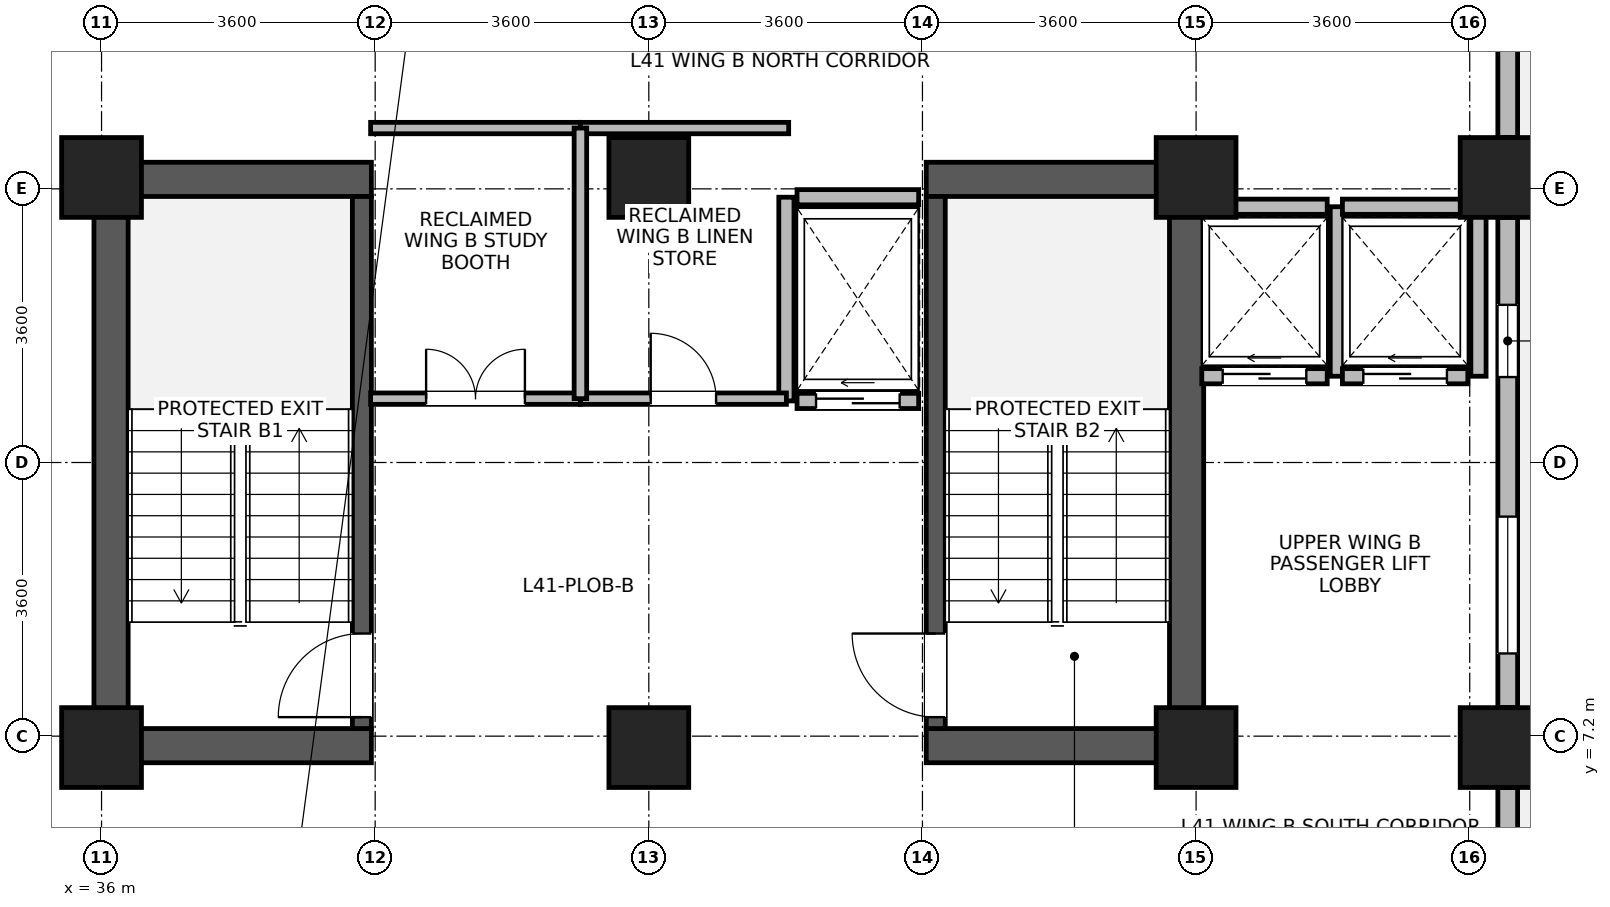
"""IFC4 building model, lengths in metres.
Left out: names, types, materials, properties, quantities, classifications, styles, units other than length and angle.
Written with IfcOpenShell. Run it as: python <this file> out.ifc"""

import sys

from ifc_helpers import new_model, si_unit, direction, frame, frame_2d, origin, origin_2d, place, context, subcontext, project, spatial, rectangle, extrude, source, transform, mapped, element, fill, save


model = new_model("IFC4")
c1 = context("Model", 3, precision=1e-05, world=origin(), true_north=direction((0.0, 1.0)))
c2 = subcontext(c1, "Body", "Model", "MODEL_VIEW")
j1 = project(units=[si_unit("LENGTHUNIT", "METRE"), si_unit("PLANEANGLEUNIT", "RADIAN")], contexts=[c1])
p1 = place(None, origin())
s1 = spatial("IfcSite", under=j1, at=p1, CompositionType="ELEMENT")
p2 = place(p1, origin())
s2 = spatial("IfcBuilding", under=s1, at=p2, CompositionType="ELEMENT")
p3 = place(p2, frame((0.0, 0.0, 162.4)))
s3 = spatial("IfcBuildingStorey", under=s2, at=p3, CompositionType="ELEMENT", Elevation=162.4)
for number, where, z_axis, x_axis in (
    (1, (36.125, 6.85, 0.0), (0.0, 0.0, 1.0), (0.0, 1.0, 0.0)),
    (2, (50.275, 6.85, 0.0), (0.0, 0.0, 1.0), (0.0, 1.0, 0.0)),
):
    element("IfcWall", number, at=place(p3, frame(where, z_axis=z_axis, x_axis=x_axis)), inside=s3, PredefinedType="SHEAR", context=c2, shape_type="SweptSolid", body=[
        extrude(rectangle(XDim=7.9, YDim=0.45, at=frame_2d((3.95, 0.0))), origin(), (0.0, 0.0, 1.0), 3.46),
    ])
for number, where, z_axis, x_axis in (
    (3, (36.35, 7.075, 0.0), (0.0, 0.0, 1.0), (1.0, 0.0, 0.0)),
    (4, (46.85, 7.075, 0.0), (0.0, 0.0, 1.0), (1.0, 0.0, 0.0)),
    (5, (36.35, 14.525, 0.0), (0.0, 0.0, 1.0), (1.0, 0.0, 0.0)),
    (6, (46.85, 14.525, 0.0), (0.0, 0.0, 1.0), (1.0, 0.0, 0.0)),
):
    element("IfcWall", number, at=place(p3, frame(where, z_axis=z_axis, x_axis=x_axis)), inside=s3, PredefinedType="SHEAR", context=c2, shape_type="SweptSolid", body=[
        extrude(rectangle(XDim=3.2, YDim=0.45, at=frame_2d((1.6, 0.0))), origin(), (0.0, 0.0, 1.0), 3.46),
    ])
p4 = place(p3, frame((39.425, 7.3, 0.0), z_axis=(0.0, 0.0, 1.0), x_axis=(0.0, 1.0, 0.0)))
e7 = element("IfcWall", 7, at=p4, inside=s3, PredefinedType="SHEAR", context=c2, shape_type="SweptSolid", body=[
    extrude(rectangle(XDim=7.0, YDim=0.25, at=frame_2d((3.5, 0.0))), origin(), (0.0, 0.0, 1.0), 3.46),
])
p5 = place(p4, frame((0.15, 0.0, 0.0)))
e8 = element("IfcOpeningElement", 8, at=p5, cuts=e7, PredefinedType="OPENING", context=c2, shape_type="SweptSolid", body=[
    extrude(rectangle(XDim=1.1, YDim=2.08, at=frame_2d((0.55, 1.04))), frame((0.0, 0.135, 0.0), z_axis=(0.0, -1.0, 0.0), x_axis=(1.0, 0.0, 0.0)), (0.0, 0.0, 1.0), 0.27),
])
p6 = place(p3, frame((46.975, 7.3, 0.0), z_axis=(0.0, 0.0, 1.0), x_axis=(0.0, 1.0, 0.0)))
e9 = element("IfcWall", 9, at=p6, inside=s3, PredefinedType="SHEAR", context=c2, shape_type="SweptSolid", body=[
    extrude(rectangle(XDim=7.0, YDim=0.25, at=frame_2d((3.5, 0.0))), origin(), (0.0, 0.0, 1.0), 3.46),
])
p7 = place(p6, frame((0.15, 0.0, 0.0)))
e10 = element("IfcOpeningElement", 10, at=p7, cuts=e9, PredefinedType="OPENING", context=c2, shape_type="SweptSolid", body=[
    extrude(rectangle(XDim=1.1, YDim=2.08, at=frame_2d((0.55, 1.04))), frame((0.0, 0.135, 0.0), z_axis=(0.0, -1.0, 0.0), x_axis=(1.0, 0.0, 0.0)), (0.0, 0.0, 1.0), 0.27),
])
m1 = source(origin(), c2, "Body", "SweptSolid", [
    extrude(rectangle(XDim=1.05, YDim=1.05, at=origin_2d()), origin(), (0.0, 0.0, 1.0), 3.7),
])
for number, where, z_axis, x_axis in (
    (11, (36.0, 7.05, 0.0), (0.0, 0.0, 1.0), (1.0, 0.0, 0.0)),
    (12, (36.0, 14.55, 0.0), (0.0, 0.0, 1.0), (1.0, 0.0, 0.0)),
    (13, (43.2, 7.05, 0.0), (0.0, 0.0, 1.0), (1.0, 0.0, 0.0)),
    (14, (43.2, 14.55, 0.0), (0.0, 0.0, 1.0), (1.0, 0.0, 0.0)),
    (15, (50.4, 7.05, 0.0), (0.0, 0.0, 1.0), (1.0, 0.0, 0.0)),
    (16, (50.4, 14.55, 0.0), (0.0, 0.0, 1.0), (1.0, 0.0, 0.0)),
    (17, (54.4, 7.05, 0.0), (0.0, 0.0, 1.0), (1.0, 0.0, 0.0)),
    (18, (54.4, 14.55, 0.0), (0.0, 0.0, 1.0), (1.0, 0.0, 0.0)),
):
    element("IfcColumn", number, at=place(p3, frame(where, z_axis=z_axis, x_axis=x_axis)), inside=s3, PredefinedType="COLUMN", context=c2, shape_type="MappedRepresentation", body=[
        mapped(m1, transform((0.0, 0.0, 0.0), x_axis=(1.0, 0.0, 0.0), y_axis=(0.0, 1.0, 0.0), z_axis=(0.0, 0.0, 1.0), scale=1.0)),
    ])
p8 = place(p3, frame((54.5, 6.524, 0.0), z_axis=(0.0, 0.0, 1.0), x_axis=(0.0, -1.0, 0.0)))
e19 = element("IfcWall", 19, at=p8, inside=s3, PredefinedType="STANDARD", context=c2, shape_type="SweptSolid", body=[
    extrude(rectangle(XDim=4.854, YDim=0.26, at=frame_2d((2.427, 0.0))), origin(), (0.0, 0.0, 1.0), 3.44),
])
p9 = place(p8, frame((2.648, 0.0, 0.0)))
e20 = element("IfcOpeningElement", 20, at=p9, cuts=e19, PredefinedType="OPENING", context=c2, shape_type="SweptSolid", body=[
    extrude(rectangle(XDim=1.5, YDim=2.15, at=frame_2d((0.75, 1.075))), frame((0.0, 0.14, 0.0), z_axis=(0.0, -1.0, 0.0), x_axis=(1.0, 0.0, 0.0)), (0.0, 0.0, 1.0), 0.28),
])
p10 = place(p3, frame((54.5, 14.024, 0.0), z_axis=(0.0, 0.0, 1.0), x_axis=(0.0, -1.0, 0.0)))
e21 = element("IfcWall", 21, at=p10, inside=s3, PredefinedType="STANDARD", context=c2, shape_type="SweptSolid", body=[
    extrude(rectangle(XDim=6.448, YDim=0.26, at=frame_2d((3.224, 0.0))), origin(), (0.0, 0.0, 1.0), 2.99),
])
p11 = place(p10, frame((3.936, 0.0, 0.85)))
e22 = element("IfcOpeningElement", 22, at=p11, cuts=e21, PredefinedType="OPENING", context=c2, shape_type="SweptSolid", body=[
    extrude(rectangle(XDim=1.8, YDim=1.85, at=frame_2d((0.9, 0.925))), frame((0.0, 0.14, 0.0), z_axis=(0.0, -1.0, 0.0), x_axis=(1.0, 0.0, 0.0)), (0.0, 0.0, 1.0), 0.28),
])
p12 = place(p10, frame((1.15, 0.0, 0.85)))
e23 = element("IfcOpeningElement", 23, at=p12, cuts=e21, PredefinedType="OPENING", context=c2, shape_type="SweptSolid", body=[
    extrude(rectangle(XDim=0.95, YDim=1.75, at=frame_2d((0.475, 0.875))), frame((0.0, 0.14, 0.0), z_axis=(0.0, -1.0, 0.0), x_axis=(1.0, 0.0, 0.0)), (0.0, 0.0, 1.0), 0.28),
])
p13 = place(p3, frame((54.5, 21.074, 0.0), z_axis=(0.0, 0.0, 1.0), x_axis=(0.0, -1.0, 0.0)))
e24 = element("IfcWall", 24, at=p13, inside=s3, PredefinedType="STANDARD", context=c2, shape_type="SweptSolid", body=[
    extrude(rectangle(XDim=5.998, YDim=0.26, at=frame_2d((2.999, 0.0))), origin(), (0.0, 0.0, 1.0), 2.99),
])
p14 = place(p13, frame((0.6, 0.0, 0.85)))
e25 = element("IfcOpeningElement", 25, at=p14, cuts=e24, PredefinedType="OPENING", context=c2, shape_type="SweptSolid", body=[
    extrude(rectangle(XDim=1.8, YDim=1.85, at=frame_2d((0.9, 0.925))), frame((0.0, 0.14, 0.0), z_axis=(0.0, -1.0, 0.0), x_axis=(1.0, 0.0, 0.0)), (0.0, 0.0, 1.0), 0.28),
])
p15 = place(p3, frame((50.475, 11.935, 0.0), z_axis=(0.0, 0.0, 1.0), x_axis=(1.0, 0.0, 0.0)))
e26 = element("IfcWall", 26, at=p15, inside=s3, PredefinedType="PARTITIONING", context=c2, shape_type="SweptSolid", body=[
    extrude(rectangle(XDim=1.65, YDim=0.2, at=frame_2d((0.825, 0.0))), origin(), (0.0, 0.0, 1.0), 3.44),
])
p16 = place(p15, frame((0.275, 0.0, 0.0)))
e27 = element("IfcOpeningElement", 27, at=p16, cuts=e26, PredefinedType="OPENING", context=c2, shape_type="SweptSolid", body=[
    extrude(rectangle(XDim=1.1, YDim=2.12, at=frame_2d((0.55, 1.06))), frame((0.0, 0.11, 0.0), z_axis=(0.0, -1.0, 0.0), x_axis=(1.0, 0.0, 0.0)), (0.0, 0.0, 1.0), 0.22),
])
p17 = place(p3, frame((50.475, 14.165, 0.0), z_axis=(0.0, 0.0, 1.0), x_axis=(1.0, 0.0, 0.0)))
e28 = element("IfcWall", 28, at=p17, inside=s3, PredefinedType="PARTITIONING", context=c2, shape_type="SweptSolid", body=[
    extrude(rectangle(XDim=1.65, YDim=0.2, at=frame_2d((0.825, 0.0))), origin(), (0.0, 0.0, 1.0), 3.44),
])
p18 = place(p3, frame((52.265, 11.935, 0.0), z_axis=(0.0, 0.0, 1.0), x_axis=(0.0, 1.0, 0.0)))
e29 = element("IfcWall", 29, at=p18, inside=s3, PredefinedType="PARTITIONING", context=c2, shape_type="SweptSolid", body=[
    extrude(rectangle(XDim=2.23, YDim=0.2, at=frame_2d((1.115, 0.0))), origin(), (0.0, 0.0, 1.0), 3.44),
])
p19 = place(p3, frame((52.325, 11.935, 0.0), z_axis=(0.0, 0.0, 1.0), x_axis=(1.0, 0.0, 0.0)))
e30 = element("IfcWall", 30, at=p19, inside=s3, PredefinedType="PARTITIONING", context=c2, shape_type="SweptSolid", body=[
    extrude(rectangle(XDim=1.65, YDim=0.2, at=frame_2d((0.825, 0.0))), origin(), (0.0, 0.0, 1.0), 3.44),
])
p20 = place(p19, frame((0.275, 0.0, 0.0)))
e31 = element("IfcOpeningElement", 31, at=p20, cuts=e30, PredefinedType="OPENING", context=c2, shape_type="SweptSolid", body=[
    extrude(rectangle(XDim=1.1, YDim=2.12, at=frame_2d((0.55, 1.06))), frame((0.0, 0.11, 0.0), z_axis=(0.0, -1.0, 0.0), x_axis=(1.0, 0.0, 0.0)), (0.0, 0.0, 1.0), 0.22),
])
p21 = place(p3, frame((52.325, 14.165, 0.0), z_axis=(0.0, 0.0, 1.0), x_axis=(1.0, 0.0, 0.0)))
e32 = element("IfcWall", 32, at=p21, inside=s3, PredefinedType="PARTITIONING", context=c2, shape_type="SweptSolid", body=[
    extrude(rectangle(XDim=1.65, YDim=0.2, at=frame_2d((0.825, 0.0))), origin(), (0.0, 0.0, 1.0), 3.44),
])
p22 = place(p3, frame((54.115, 11.935, 0.0), z_axis=(0.0, 0.0, 1.0), x_axis=(0.0, 1.0, 0.0)))
e33 = element("IfcWall", 33, at=p22, inside=s3, PredefinedType="PARTITIONING", context=c2, shape_type="SweptSolid", body=[
    extrude(rectangle(XDim=2.23, YDim=0.2, at=frame_2d((1.115, 0.0))), origin(), (0.0, 0.0, 1.0), 2.99),
])
p23 = place(p3, frame((45.15, 11.61, 0.0), z_axis=(0.0, 0.0, 1.0), x_axis=(1.0, 0.0, 0.0)))
e34 = element("IfcWall", 34, at=p23, inside=s3, PredefinedType="PARTITIONING", context=c2, shape_type="SweptSolid", body=[
    extrude(rectangle(XDim=1.6, YDim=0.2, at=frame_2d((0.8, 0.0))), origin(), (0.0, 0.0, 1.0), 3.44),
])
p24 = place(p23, frame((0.25, 0.0, 0.0)))
e35 = element("IfcOpeningElement", 35, at=p24, cuts=e34, PredefinedType="OPENING", context=c2, shape_type="SweptSolid", body=[
    extrude(rectangle(XDim=1.1, YDim=2.12, at=frame_2d((0.55, 1.06))), frame((0.0, 0.11, 0.0), z_axis=(0.0, -1.0, 0.0), x_axis=(1.0, 0.0, 0.0)), (0.0, 0.0, 1.0), 0.22),
])
p25 = place(p3, frame((45.15, 14.29, 0.0), z_axis=(0.0, 0.0, 1.0), x_axis=(1.0, 0.0, 0.0)))
e36 = element("IfcWall", 36, at=p25, inside=s3, PredefinedType="PARTITIONING", context=c2, shape_type="SweptSolid", body=[
    extrude(rectangle(XDim=1.6, YDim=0.2, at=frame_2d((0.8, 0.0))), origin(), (0.0, 0.0, 1.0), 2.44),
])
p26 = place(p3, frame((45.01, 11.61, 0.0), z_axis=(0.0, 0.0, 1.0), x_axis=(0.0, 1.0, 0.0)))
e37 = element("IfcWall", 37, at=p26, inside=s3, PredefinedType="PARTITIONING", context=c2, shape_type="SweptSolid", body=[
    extrude(rectangle(XDim=2.68, YDim=0.2, at=frame_2d((1.34, 0.0))), origin(), (0.0, 0.0, 1.0), 3.44),
])
p27 = place(p3, frame((39.54, 11.64, 0.0), z_axis=(0.0, 0.0, 1.0), x_axis=(1.0, 0.0, 0.0)))
e38 = element("IfcWall", 38, at=p27, inside=s3, PredefinedType="PARTITIONING", context=c2, shape_type="SweptSolid", body=[
    extrude(rectangle(XDim=2.76, YDim=0.15, at=frame_2d((1.38, 0.0))), origin(), (0.0, 0.0, 1.0), 3.44),
])
p28 = place(p27, frame((0.73, 0.0, 0.0)))
e39 = element("IfcOpeningElement", 39, at=p28, cuts=e38, PredefinedType="OPENING", context=c2, shape_type="SweptSolid", body=[
    extrude(rectangle(XDim=1.3, YDim=2.12, at=frame_2d((0.65, 1.06))), frame((0.0, 0.085, 0.0), z_axis=(0.0, -1.0, 0.0), x_axis=(1.0, 0.0, 0.0)), (0.0, 0.0, 1.0), 0.17),
])
p29 = place(p3, frame((39.54, 15.2, 0.0), z_axis=(0.0, 0.0, 1.0), x_axis=(1.0, 0.0, 0.0)))
e40 = element("IfcWall", 40, at=p29, inside=s3, PredefinedType="PARTITIONING", context=c2, shape_type="SweptSolid", body=[
    extrude(rectangle(XDim=2.76, YDim=0.15, at=frame_2d((1.38, 0.0))), origin(), (0.0, 0.0, 1.0), 3.44),
])
p30 = place(p3, frame((42.3, 11.64, 0.0), z_axis=(0.0, 0.0, 1.0), x_axis=(1.0, 0.0, 0.0)))
e41 = element("IfcWall", 41, at=p30, inside=s3, PredefinedType="PARTITIONING", context=c2, shape_type="SweptSolid", body=[
    extrude(rectangle(XDim=2.71, YDim=0.15, at=frame_2d((1.355, 0.0))), origin(), (0.0, 0.0, 1.0), 3.44),
])
p31 = place(p30, frame((0.925, 0.0, 0.0)))
e42 = element("IfcOpeningElement", 42, at=p31, cuts=e41, PredefinedType="OPENING", context=c2, shape_type="SweptSolid", body=[
    extrude(rectangle(XDim=0.86, YDim=2.02, at=frame_2d((0.43, 1.01))), frame((0.0, 0.085, 0.0), z_axis=(0.0, -1.0, 0.0), x_axis=(1.0, 0.0, 0.0)), (0.0, 0.0, 1.0), 0.17),
])
p32 = place(p3, frame((42.3, 15.2, 0.0), z_axis=(0.0, 0.0, 1.0), x_axis=(1.0, 0.0, 0.0)))
e43 = element("IfcWall", 43, at=p32, inside=s3, PredefinedType="PARTITIONING", context=c2, shape_type="SweptSolid", body=[
    extrude(rectangle(XDim=2.74, YDim=0.15, at=frame_2d((1.37, 0.0))), origin(), (0.0, 0.0, 1.0), 3.44),
])
p33 = place(p3, frame((42.3, 11.64, 0.0), z_axis=(0.0, 0.0, 1.0), x_axis=(0.0, 1.0, 0.0)))
e44 = element("IfcWall", 44, at=p33, inside=s3, PredefinedType="PARTITIONING", context=c2, shape_type="SweptSolid", body=[
    extrude(rectangle(XDim=3.56, YDim=0.165, at=frame_2d((1.78, 0.0))), origin(), (0.0, 0.0, 1.0), 3.44),
])
p34 = place(p11, origin())
e45 = element("IfcWindow", 45, at=p34, inside=s3, PartitioningType="SINGLE_PANEL", PredefinedType="WINDOW", context=c2, shape_type="SweptSolid", body=[
    extrude(rectangle(XDim=1.8, YDim=1.85, at=frame_2d((0.9, 0.925))), frame((0.0, 0.03, 0.0), z_axis=(0.0, -1.0, 0.0), x_axis=(1.0, 0.0, 0.0)), (0.0, 0.0, 1.0), 0.06),
])
fill(e22, e45)
p35 = place(p12, origin())
e46 = element("IfcWindow", 46, at=p35, inside=s3, PartitioningType="SINGLE_PANEL", PredefinedType="WINDOW", context=c2, shape_type="SweptSolid", body=[
    extrude(rectangle(XDim=0.95, YDim=1.75, at=frame_2d((0.475, 0.875))), frame((0.0, 0.03, 0.0), z_axis=(0.0, -1.0, 0.0), x_axis=(1.0, 0.0, 0.0)), (0.0, 0.0, 1.0), 0.06),
])
fill(e23, e46)
p36 = place(p5, origin())
e47 = element("IfcDoor", 47, at=p36, inside=s3, OperationType="SINGLE_SWING_LEFT", PredefinedType="DOOR", context=c2, shape_type="SweptSolid", body=[
    extrude(rectangle(XDim=1.1, YDim=2.08, at=frame_2d((0.55, 1.04))), frame((0.0, 0.025, 0.0), z_axis=(0.0, -1.0, 0.0), x_axis=(1.0, 0.0, 0.0)), (0.0, 0.0, 1.0), 0.05),
])
fill(e8, e47)
p37 = place(p7, origin())
e48 = element("IfcDoor", 48, at=p37, inside=s3, OperationType="SINGLE_SWING_RIGHT", PredefinedType="DOOR", context=c2, shape_type="SweptSolid", body=[
    extrude(rectangle(XDim=1.1, YDim=2.08, at=frame_2d((0.55, 1.04))), frame((0.0, 0.025, 0.0), z_axis=(0.0, -1.0, 0.0), x_axis=(1.0, 0.0, 0.0)), (0.0, 0.0, 1.0), 0.05),
])
fill(e10, e48)
p38 = place(p16, origin())
e49 = element("IfcDoor", 49, at=p38, inside=s3, OperationType="SLIDING_TO_LEFT", PredefinedType="DOOR", context=c2, shape_type="SweptSolid", body=[
    extrude(rectangle(XDim=1.1, YDim=2.12, at=frame_2d((0.55, 1.06))), frame((0.0, 0.025, 0.0), z_axis=(0.0, -1.0, 0.0), x_axis=(1.0, 0.0, 0.0)), (0.0, 0.0, 1.0), 0.05),
])
fill(e27, e49)
p39 = place(p20, origin())
e50 = element("IfcDoor", 50, at=p39, inside=s3, OperationType="SLIDING_TO_LEFT", PredefinedType="DOOR", context=c2, shape_type="SweptSolid", body=[
    extrude(rectangle(XDim=1.1, YDim=2.12, at=frame_2d((0.55, 1.06))), frame((0.0, 0.025, 0.0), z_axis=(0.0, -1.0, 0.0), x_axis=(1.0, 0.0, 0.0)), (0.0, 0.0, 1.0), 0.05),
])
fill(e31, e50)
p40 = place(p24, origin())
e51 = element("IfcDoor", 51, at=p40, inside=s3, OperationType="SLIDING_TO_LEFT", PredefinedType="DOOR", context=c2, shape_type="SweptSolid", body=[
    extrude(rectangle(XDim=1.1, YDim=2.12, at=frame_2d((0.55, 1.06))), frame((0.0, 0.025, 0.0), z_axis=(0.0, -1.0, 0.0), x_axis=(1.0, 0.0, 0.0)), (0.0, 0.0, 1.0), 0.05),
])
fill(e35, e51)
p41 = place(p28, origin())
e52 = element("IfcDoor", 52, at=p41, inside=s3, OperationType="DOUBLE_DOOR_SINGLE_SWING", PredefinedType="DOOR", context=c2, shape_type="SweptSolid", body=[
    extrude(rectangle(XDim=1.3, YDim=2.12, at=frame_2d((0.65, 1.06))), frame((0.0, 0.025, 0.0), z_axis=(0.0, -1.0, 0.0), x_axis=(1.0, 0.0, 0.0)), (0.0, 0.0, 1.0), 0.05),
])
fill(e39, e52)
p42 = place(p31, origin())
e53 = element("IfcDoor", 53, at=p42, inside=s3, OperationType="SINGLE_SWING_LEFT", PredefinedType="DOOR", context=c2, shape_type="SweptSolid", body=[
    extrude(rectangle(XDim=0.86, YDim=2.02, at=frame_2d((0.43, 1.01))), frame((0.0, 0.025, 0.0), z_axis=(0.0, -1.0, 0.0), x_axis=(1.0, 0.0, 0.0)), (0.0, 0.0, 1.0), 0.05),
])
fill(e42, e53)
save(model, sys.argv[1])
